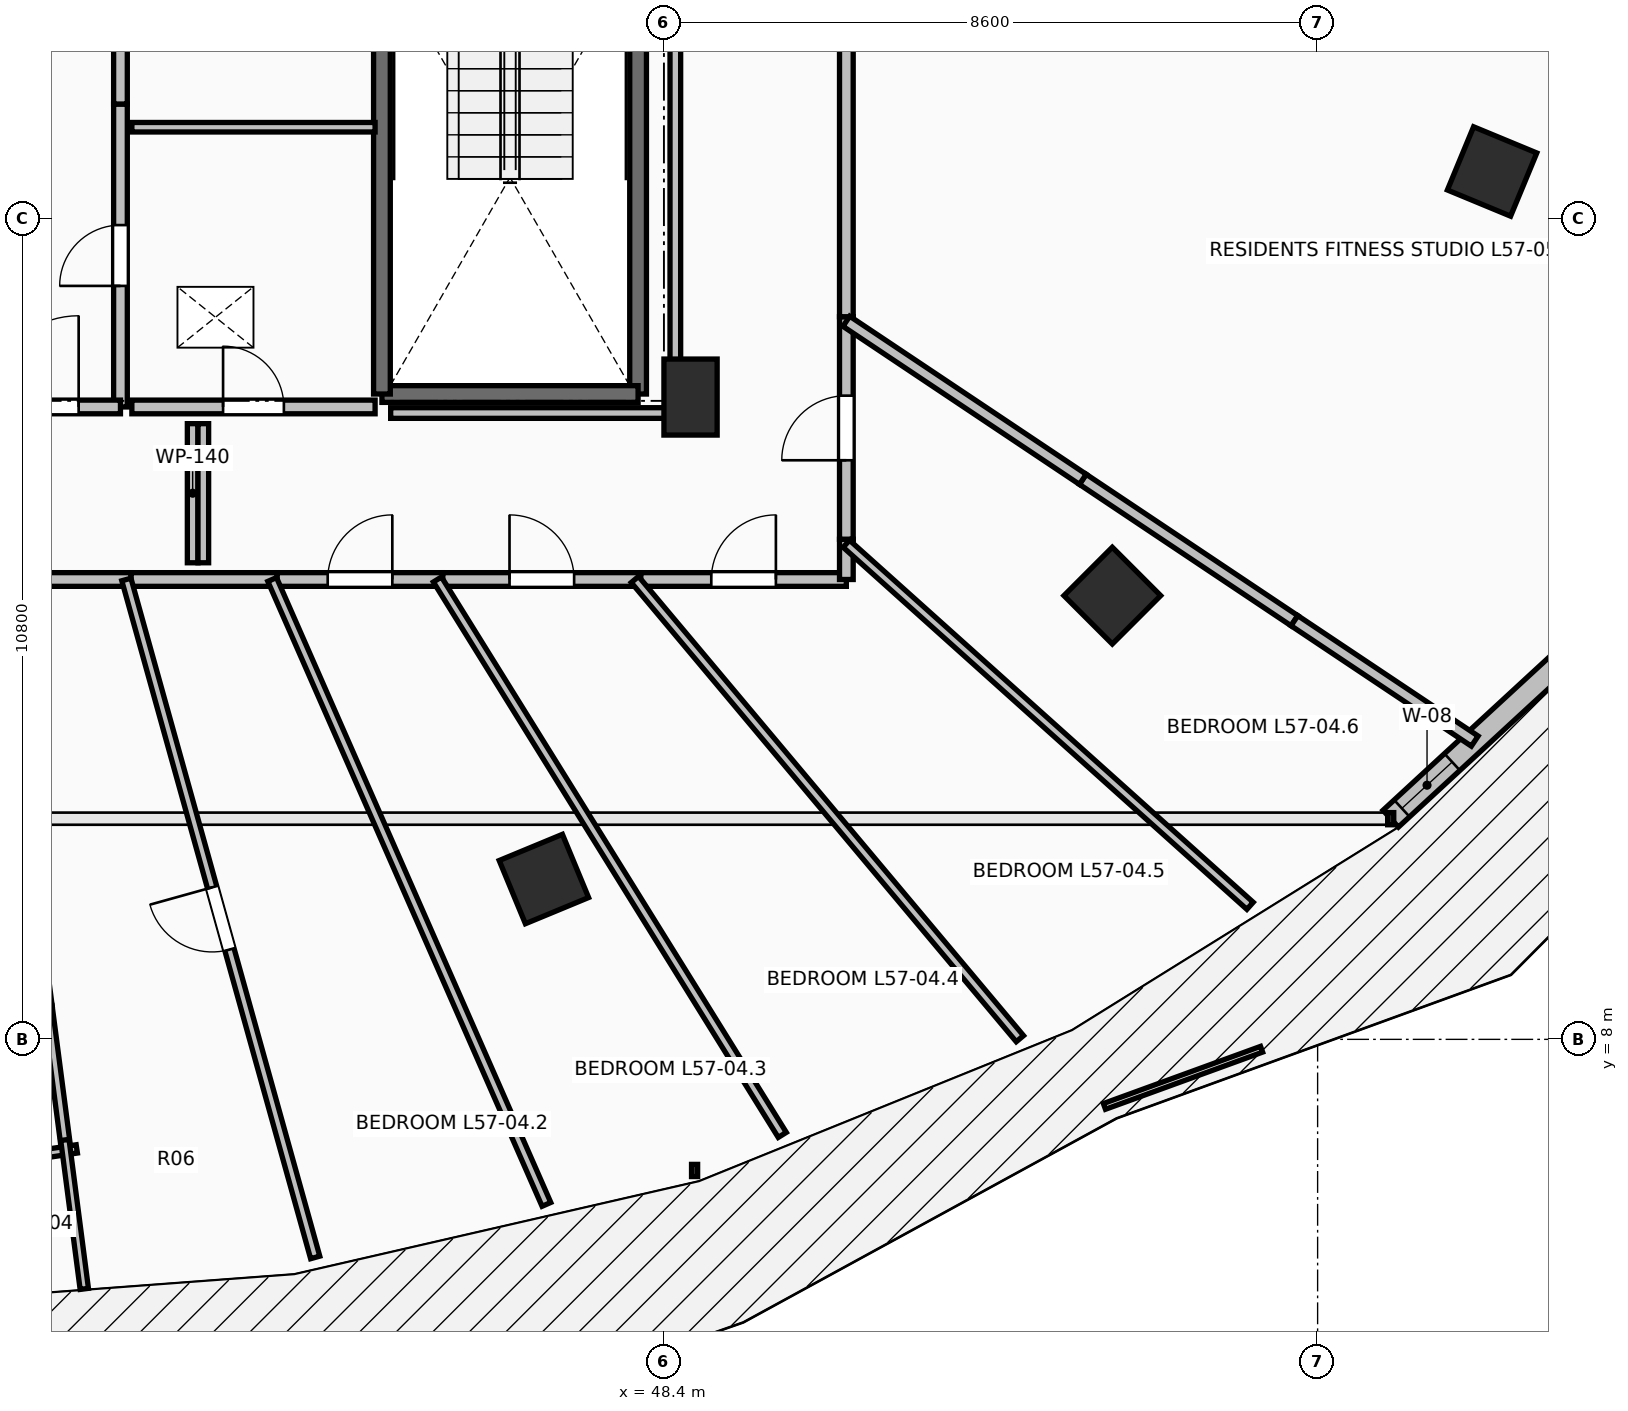
"""IFC4 building model, lengths in metres.
Left out: names, types, materials, properties, quantities, classifications, styles, units other than length and angle.
Written with IfcOpenShell. Run it as: python <this file> out.ifc"""

import sys

from ifc_helpers import new_model, si_unit, direction, frame, frame_2d, origin, origin_2d, place, context, subcontext, project, spatial, rectangle, extrude, element, fill, save


model = new_model("IFC4")
c1 = context("Model", 3, precision=1e-05, world=origin(), true_north=direction((0.0, 1.0)))
c2 = subcontext(c1, "Body", "Model", "MODEL_VIEW")
j1 = project(units=[si_unit("LENGTHUNIT", "METRE"), si_unit("PLANEANGLEUNIT", "RADIAN")], contexts=[c1])
p1 = place(None, origin())
s1 = spatial("IfcSite", under=j1, at=p1, CompositionType="ELEMENT")
p2 = place(p1, origin())
s2 = spatial("IfcBuilding", under=s1, at=p2, CompositionType="ELEMENT")
p3 = place(p2, frame((0.0, 0.0, 210.75)))
s3 = spatial("IfcBuildingStorey", under=s2, at=p3, CompositionType="ELEMENT", Elevation=210.75)
for number, where, z_axis, x_axis in (
    (1, (46.821, 10.109, 0.0), (0.0, 0.0, 1.0), (0.383, -0.924, 0.0)),
    (2, (54.299, 13.838, 0.0), (0.0, 0.0, 1.0), (0.707, -0.707, 0.0)),
    (3, (59.295, 19.418, 0.0), (0.0, 0.0, 1.0), (0.924, -0.383, 0.0)),
):
    element("IfcColumn", number, at=place(p3, frame(where, z_axis=z_axis, x_axis=x_axis)), inside=s3, PredefinedType="COLUMN", context=c2, shape_type="SweptSolid", body=[
        extrude(rectangle(XDim=0.9, YDim=0.9, at=origin_2d()), origin(), (0.0, 0.0, 1.0), 3.55),
    ])
p4 = place(p3, frame((48.75, 16.45, 0.0), z_axis=(0.0, 0.0, 1.0), x_axis=(1.0, 0.0, 0.0)))
e4 = element("IfcColumn", 4, at=p4, inside=s3, PredefinedType="PILASTER", context=c2, shape_type="SweptSolid", body=[
    extrude(rectangle(XDim=0.7, YDim=1.0, at=origin_2d()), origin(), (0.0, 0.0, 1.0), 3.55),
])
p5 = place(p3, frame((57.962, 10.903, 0.0), z_axis=(0.0, 0.0, 1.0), x_axis=(0.735359993374, 0.677676678177, 0.0)))
e5 = element("IfcWall", 5, at=p5, inside=s3, PredefinedType="STANDARD", context=c2, shape_type="SweptSolid", body=[
    extrude(rectangle(XDim=4.774, YDim=0.3, at=frame_2d((2.387, 0.0))), origin(), (0.0, 0.0, 1.0), 3.29),
])
p6 = place(p5, frame((0.2, 0.0, 0.85)))
e6 = element("IfcOpeningElement", 6, at=p6, cuts=e5, PredefinedType="OPENING", context=c2, shape_type="SweptSolid", body=[
    extrude(rectangle(XDim=0.9, YDim=1.8, at=frame_2d((0.45, 0.9))), frame((0.0, 0.165, 0.0), z_axis=(0.0, -1.0, 0.0), x_axis=(1.0, 0.0, 0.0)), (0.0, 0.0, 1.0), 0.33),
])
p7 = place(p3, frame((48.06, 23.91, 0.0), z_axis=(0.0, 0.0, 1.0), x_axis=(0.0, -1.0, 0.0)))
e7 = element("IfcWall", 7, at=p7, inside=s3, PredefinedType="SOLIDWALL", context=c2, shape_type="SweptSolid", body=[
    extrude(rectangle(XDim=7.42, YDim=0.22, at=frame_2d((3.71, 0.0))), origin(), (0.0, 0.0, 1.0), 3.29),
])
p8 = place(p3, frame((48.06, 16.49, 0.0), z_axis=(0.0, 0.0, 1.0), x_axis=(-1.0, 0.0, 0.0)))
e8 = element("IfcWall", 8, at=p8, inside=s3, PredefinedType="SOLIDWALL", context=c2, shape_type="SweptSolid", body=[
    extrude(rectangle(XDim=3.37, YDim=0.22, at=frame_2d((1.685, 0.0))), origin(), (0.0, 0.0, 1.0), 3.29),
])
p9 = place(p3, frame((44.69, 16.49, 0.0), z_axis=(0.0, 0.0, 1.0), x_axis=(0.0, 1.0, 0.0)))
e9 = element("IfcWall", 9, at=p9, inside=s3, PredefinedType="SOLIDWALL", context=c2, shape_type="SweptSolid", body=[
    extrude(rectangle(XDim=7.42, YDim=0.22, at=frame_2d((3.71, 0.0))), origin(), (0.0, 0.0, 1.0), 3.29),
])
p10 = place(p3, frame((41.25, 16.32, 0.0), z_axis=(0.0, 0.0, 1.0), x_axis=(0.0, 1.0, 0.0)))
e10 = element("IfcWall", 10, at=p10, inside=s3, PredefinedType="PARTITIONING", context=c2, shape_type="SweptSolid", body=[
    extrude(rectangle(XDim=3.985, YDim=0.18, at=frame_2d((1.992, 0.0))), origin(), (0.0, 0.0, 1.0), 3.29),
])
p11 = place(p10, frame((1.593, 0.0, 0.0)))
e11 = element("IfcOpeningElement", 11, at=p11, cuts=e10, PredefinedType="OPENING", context=c2, shape_type="SweptSolid", body=[
    extrude(rectangle(XDim=0.8, YDim=2.05, at=frame_2d((0.4, 1.025))), frame((0.0, 0.105, 0.0), z_axis=(0.0, -1.0, 0.0), x_axis=(1.0, 0.0, 0.0)), (0.0, 0.0, 1.0), 0.21),
])
p12 = place(p3, frame((41.25, 20.305, 0.0), z_axis=(0.0, 0.0, 1.0), x_axis=(0.0, 1.0, 0.0)))
e12 = element("IfcWall", 12, at=p12, inside=s3, PredefinedType="PARTITIONING", context=c2, shape_type="SweptSolid", body=[
    extrude(rectangle(XDim=3.895, YDim=0.18, at=frame_2d((1.948, 0.0))), origin(), (0.0, 0.0, 1.0), 3.29),
])
p13 = place(p12, frame((1.522, 0.0, 0.0)))
e13 = element("IfcOpeningElement", 13, at=p13, cuts=e12, PredefinedType="OPENING", context=c2, shape_type="SweptSolid", body=[
    extrude(rectangle(XDim=0.85, YDim=2.1, at=frame_2d((0.425, 1.05))), frame((0.0, 0.105, 0.0), z_axis=(0.0, -1.0, 0.0), x_axis=(1.0, 0.0, 0.0)), (0.0, 0.0, 1.0), 0.21),
])
p14 = place(p3, frame((38.95, 16.32, 0.0), z_axis=(0.0, 0.0, 1.0), x_axis=(1.0, 0.0, 0.0)))
e14 = element("IfcWall", 14, at=p14, inside=s3, PredefinedType="PARTITIONING", context=c2, shape_type="SweptSolid", body=[
    extrude(rectangle(XDim=2.3, YDim=0.18, at=frame_2d((1.15, 0.0))), origin(), (0.0, 0.0, 1.0), 3.29),
])
p15 = place(p14, frame((0.55, 0.0, 0.0)))
e15 = element("IfcOpeningElement", 15, at=p15, cuts=e14, PredefinedType="OPENING", context=c2, shape_type="SweptSolid", body=[
    extrude(rectangle(XDim=1.2, YDim=2.15, at=frame_2d((0.6, 1.075))), frame((0.0, 0.105, 0.0), z_axis=(0.0, -1.0, 0.0), x_axis=(1.0, 0.0, 0.0)), (0.0, 0.0, 1.0), 0.21),
])
p16 = place(p3, frame((44.6, 20.0, 0.0), z_axis=(0.0, 0.0, 1.0), x_axis=(-1.0, 0.0, 0.0)))
e16 = element("IfcWall", 16, at=p16, inside=s3, PredefinedType="PARTITIONING", context=c2, shape_type="SweptSolid", body=[
    extrude(rectangle(XDim=3.2, YDim=0.125, at=frame_2d((1.6, 0.0))), origin(), (0.0, 0.0, 1.0), 3.29),
])
p17 = place(p3, frame((41.4, 16.32, 0.0), z_axis=(0.0, 0.0, 1.0), x_axis=(1.0, 0.0, 0.0)))
e17 = element("IfcWall", 17, at=p17, inside=s3, PredefinedType="PARTITIONING", context=c2, shape_type="SweptSolid", body=[
    extrude(rectangle(XDim=3.2, YDim=0.18, at=frame_2d((1.6, 0.0))), origin(), (0.0, 0.0, 1.0), 3.29),
])
p18 = place(p17, frame((1.2, 0.0, 0.0)))
e18 = element("IfcOpeningElement", 18, at=p18, cuts=e17, PredefinedType="OPENING", context=c2, shape_type="SweptSolid", body=[
    extrude(rectangle(XDim=0.8, YDim=2.05, at=frame_2d((0.4, 1.025))), frame((0.0, 0.105, 0.0), z_axis=(0.0, -1.0, 0.0), x_axis=(1.0, 0.0, 0.0)), (0.0, 0.0, 1.0), 0.21),
])
p19 = place(p3, frame((39.618, 14.05, 0.0), z_axis=(0.0, 0.0, 1.0), x_axis=(1.0, 0.0, 0.0)))
e19 = element("IfcWall", 19, at=p19, inside=s3, PredefinedType="PARTITIONING", context=c2, shape_type="SweptSolid", body=[
    extrude(rectangle(XDim=1.772, YDim=0.18, at=frame_2d((0.886, 0.0))), origin(), (0.0, 0.0, 1.0), 2.979),
])
p20 = place(p3, frame((41.39, 14.05, 0.0), z_axis=(0.0, 0.0, 1.0), x_axis=(1.0, 0.0, 0.0)))
e20 = element("IfcWall", 20, at=p20, inside=s3, PredefinedType="PARTITIONING", context=c2, shape_type="SweptSolid", body=[
    extrude(rectangle(XDim=1.922, YDim=0.18, at=frame_2d((0.961, 0.0))), origin(), (0.0, 0.0, 1.0), 2.979),
])
p21 = place(p3, frame((43.312, 14.05, 0.0), z_axis=(0.0, 0.0, 1.0), x_axis=(1.0, 0.0, 0.0)))
e21 = element("IfcWall", 21, at=p21, inside=s3, PredefinedType="PARTITIONING", context=c2, shape_type="SweptSolid", body=[
    extrude(rectangle(XDim=2.179, YDim=0.18, at=frame_2d((1.089, 0.0))), origin(), (0.0, 0.0, 1.0), 2.482),
])
p22 = place(p21, frame((0.665, 0.0, 0.0)))
e22 = element("IfcOpeningElement", 22, at=p22, cuts=e21, PredefinedType="OPENING", context=c2, shape_type="SweptSolid", body=[
    extrude(rectangle(XDim=0.85, YDim=2.1, at=frame_2d((0.425, 1.05))), frame((0.0, 0.105, 0.0), z_axis=(0.0, -1.0, 0.0), x_axis=(1.0, 0.0, 0.0)), (0.0, 0.0, 1.0), 0.21),
])
p23 = place(p3, frame((45.491, 14.05, 0.0), z_axis=(0.0, 0.0, 1.0), x_axis=(1.0, 0.0, 0.0)))
e23 = element("IfcWall", 23, at=p23, inside=s3, PredefinedType="PARTITIONING", context=c2, shape_type="SweptSolid", body=[
    extrude(rectangle(XDim=2.605, YDim=0.18, at=frame_2d((1.302, 0.0))), origin(), (0.0, 0.0, 1.0), 2.482),
])
p24 = place(p23, frame((0.877, 0.0, 0.0)))
e24 = element("IfcOpeningElement", 24, at=p24, cuts=e23, PredefinedType="OPENING", context=c2, shape_type="SweptSolid", body=[
    extrude(rectangle(XDim=0.85, YDim=2.1, at=frame_2d((0.425, 1.05))), frame((0.0, 0.105, 0.0), z_axis=(0.0, -1.0, 0.0), x_axis=(1.0, 0.0, 0.0)), (0.0, 0.0, 1.0), 0.21),
])
p25 = place(p3, frame((48.096, 14.05, 0.0), z_axis=(0.0, 0.0, 1.0), x_axis=(1.0, 0.0, 0.0)))
e25 = element("IfcWall", 25, at=p25, inside=s3, PredefinedType="PARTITIONING", context=c2, shape_type="SweptSolid", body=[
    extrude(rectangle(XDim=2.704, YDim=0.18, at=frame_2d((1.352, 0.0))), origin(), (0.0, 0.0, 1.0), 2.482),
])
p26 = place(p25, frame((0.927, 0.0, 0.0)))
e26 = element("IfcOpeningElement", 26, at=p26, cuts=e25, PredefinedType="OPENING", context=c2, shape_type="SweptSolid", body=[
    extrude(rectangle(XDim=0.85, YDim=2.1, at=frame_2d((0.425, 1.05))), frame((0.0, 0.105, 0.0), z_axis=(0.0, -1.0, 0.0), x_axis=(1.0, 0.0, 0.0)), (0.0, 0.0, 1.0), 0.21),
])
p27 = place(p3, frame((50.8, 14.05, 0.0), z_axis=(0.0, 0.0, 1.0), x_axis=(0.0, 1.0, 0.0)))
e27 = element("IfcWall", 27, at=p27, inside=s3, PredefinedType="PARTITIONING", context=c2, shape_type="SweptSolid", body=[
    extrude(rectangle(XDim=0.53, YDim=0.18, at=frame_2d((0.265, 0.0))), origin(), (0.0, 0.0, 1.0), 2.936),
])
p28 = place(p3, frame((50.8, 14.58, 0.0), z_axis=(0.0, 0.0, 1.0), x_axis=(0.0, 1.0, 0.0)))
e28 = element("IfcWall", 28, at=p28, inside=s3, PredefinedType="PARTITIONING", context=c2, shape_type="SweptSolid", body=[
    extrude(rectangle(XDim=2.927, YDim=0.18, at=frame_2d((1.463, 0.0))), origin(), (0.0, 0.0, 1.0), 2.482),
])
p29 = place(p28, frame((1.039, 0.0, 0.0)))
e29 = element("IfcOpeningElement", 29, at=p29, cuts=e28, PredefinedType="OPENING", context=c2, shape_type="SweptSolid", body=[
    extrude(rectangle(XDim=0.85, YDim=2.1, at=frame_2d((0.425, 1.05))), frame((0.0, 0.105, 0.0), z_axis=(0.0, -1.0, 0.0), x_axis=(1.0, 0.0, 0.0)), (0.0, 0.0, 1.0), 0.21),
])
p30 = place(p3, frame((50.8, 17.507, 0.0), z_axis=(0.0, 0.0, 1.0), x_axis=(0.0, 1.0, 0.0)))
e30 = element("IfcWall", 30, at=p30, inside=s3, PredefinedType="PARTITIONING", context=c2, shape_type="SweptSolid", body=[
    extrude(rectangle(XDim=7.043, YDim=0.18, at=frame_2d((3.521, 0.0))), origin(), (0.0, 0.0, 1.0), 2.979),
])
p31 = place(p3, frame((40.289, 8.436, 0.0), z_axis=(0.0, 0.0, 1.0), x_axis=(0.12959001093, -0.991567662375, 0.0)))
e31 = element("IfcWall", 31, at=p31, inside=s3, PredefinedType="PARTITIONING", context=c2, shape_type="SweptSolid", body=[
    extrude(rectangle(XDim=1.914, YDim=0.125, at=frame_2d((0.957, 0.0))), origin(), (0.0, 0.0, 1.0), 3.29),
])
p32 = place(p3, frame((40.675, 6.559, 0.0), z_axis=(0.0, 0.0, 1.0), x_axis=(-0.988857545323, -0.148864888602, 0.0)))
e32 = element("IfcWall", 32, at=p32, inside=s3, PredefinedType="PARTITIONING", context=c2, shape_type="SweptSolid", body=[
    extrude(rectangle(XDim=2.845, YDim=0.11, at=frame_2d((1.423, 0.0))), origin(), (0.0, 0.0, 1.0), 3.29),
])
p33 = place(p3, frame((40.774, 4.717, 0.0), z_axis=(0.0, 0.0, 1.0), x_axis=(-0.129233545587, 0.991614184396, 0.0)))
e33 = element("IfcWall", 33, at=p33, inside=s3, PredefinedType="PARTITIONING", context=c2, shape_type="SweptSolid", body=[
    extrude(rectangle(XDim=1.976, YDim=0.11, at=frame_2d((0.988, 0.0))), origin(), (0.0, 0.0, 1.0), 3.29),
])
p34 = place(p3, frame((43.812, 5.131, 0.0), z_axis=(0.0, 0.0, 1.0), x_axis=(-0.268310216589, 0.963332563383, 0.0)))
e34 = element("IfcWall", 34, at=p34, inside=s3, PredefinedType="PARTITIONING", context=c2, shape_type="SweptSolid", body=[
    extrude(rectangle(XDim=9.259, YDim=0.125, at=frame_2d((4.629, 0.0))), origin(), (0.0, 0.0, 1.0), 2.482),
])
p35 = place(p34, frame((4.204, 0.0, 0.0)))
e35 = element("IfcOpeningElement", 35, at=p35, cuts=e34, PredefinedType="OPENING", context=c2, shape_type="SweptSolid", body=[
    extrude(rectangle(XDim=0.85, YDim=2.1, at=frame_2d((0.425, 1.05))), frame((0.0, 0.077, 0.0), z_axis=(0.0, -1.0, 0.0), x_axis=(1.0, 0.0, 0.0)), (0.0, 0.0, 1.0), 0.155),
])
p36 = place(p3, frame((46.854, 5.829, 0.0), z_axis=(0.0, 0.0, 1.0), x_axis=(-0.401869944724, 0.915696755224, 0.0)))
e36 = element("IfcWall", 36, at=p36, inside=s3, PredefinedType="PARTITIONING", context=c2, shape_type="SweptSolid", body=[
    extrude(rectangle(XDim=8.978, YDim=0.125, at=frame_2d((4.489, 0.0))), origin(), (0.0, 0.0, 1.0), 2.482),
])
p37 = place(p3, frame((49.957, 6.743, 0.0), z_axis=(0.0, 0.0, 1.0), x_axis=(-0.527501342892, 0.849554196769, 0.0)))
e37 = element("IfcWall", 37, at=p37, inside=s3, PredefinedType="PARTITIONING", context=c2, shape_type="SweptSolid", body=[
    extrude(rectangle(XDim=8.601, YDim=0.125, at=frame_2d((4.301, 0.0))), origin(), (0.0, 0.0, 1.0), 2.482),
])
p38 = place(p3, frame((53.083, 8.009, 0.0), z_axis=(0.0, 0.0, 1.0), x_axis=(-0.642484403916, 0.766298760749, 0.0)))
e38 = element("IfcWall", 38, at=p38, inside=s3, PredefinedType="PARTITIONING", context=c2, shape_type="SweptSolid", body=[
    extrude(rectangle(XDim=7.883, YDim=0.125, at=frame_2d((3.942, 0.0))), origin(), (0.0, 0.0, 1.0), 2.482),
])
p39 = place(p3, frame((56.111, 9.757, 0.0), z_axis=(0.0, 0.0, 1.0), x_axis=(-0.744477346253, 0.667647722168, 0.0)))
e39 = element("IfcWall", 39, at=p39, inside=s3, PredefinedType="PARTITIONING", context=c2, shape_type="SweptSolid", body=[
    extrude(rectangle(XDim=7.134, YDim=0.125, at=frame_2d((3.567, 0.0))), origin(), (0.0, 0.0, 1.0), 2.824),
])
p40 = place(p3, frame((56.695, 13.508, 0.0), z_axis=(0.0, 0.0, 1.0), x_axis=(-0.831533913479, 0.55547398745, 0.0)))
e40 = element("IfcWall", 40, at=p40, inside=s3, PredefinedType="PARTITIONING", context=c2, shape_type="SweptSolid", body=[
    extrude(rectangle(XDim=3.348, YDim=0.16, at=frame_2d((1.674, 0.0))), origin(), (0.0, 0.0, 1.0), 2.824),
])
p41 = place(p3, frame((53.911, 15.368, 0.0), z_axis=(0.0, 0.0, 1.0), x_axis=(-0.83140728108, 0.55566350696, 0.0)))
e41 = element("IfcWall", 41, at=p41, inside=s3, PredefinedType="PARTITIONING", context=c2, shape_type="SweptSolid", body=[
    extrude(rectangle(XDim=3.742, YDim=0.16, at=frame_2d((1.871, 0.0))), origin(), (0.0, 0.0, 1.0), 2.936),
])
p42 = place(p3, frame((59.067, 11.924, 0.0), z_axis=(0.0, 0.0, 1.0), x_axis=(-0.831602270354, 0.555371644885, 0.0)))
e42 = element("IfcWall", 42, at=p42, inside=s3, PredefinedType="PARTITIONING", context=c2, shape_type="SweptSolid", body=[
    extrude(rectangle(XDim=2.852, YDim=0.16, at=frame_2d((1.426, 0.0))), origin(), (0.0, 0.0, 1.0), 3.29),
])
p43 = place(p3, frame((44.805, 16.24, 0.0), z_axis=(0.0, 0.0, 1.0), x_axis=(1.0, 0.0, 0.0)))
e43 = element("IfcWall", 43, at=p43, inside=s3, PredefinedType="PARTITIONING", context=c2, shape_type="SweptSolid", body=[
    extrude(rectangle(XDim=3.745, YDim=0.14, at=frame_2d((1.873, 0.0))), origin(), (0.0, 0.0, 1.0), 2.482),
])
p44 = place(p3, frame((48.55, 16.24, 0.0), z_axis=(0.0, 0.0, 1.0), x_axis=(0.0, 1.0, 0.0)))
e44 = element("IfcWall", 44, at=p44, inside=s3, PredefinedType="PARTITIONING", context=c2, shape_type="SweptSolid", body=[
    extrude(rectangle(XDim=7.514, YDim=0.14, at=frame_2d((3.757, 0.0))), origin(), (0.0, 0.0, 1.0), 2.482),
])
for number, where, z_axis, x_axis in (
    (45, (42.2, 16.1, 0.0), (0.0, 0.0, 1.0), (0.0, -1.0, 0.0)),
    (46, (42.34, 14.27, 0.0), (0.0, 0.0, 1.0), (0.0, 1.0, 0.0)),
):
    element("IfcWall", number, at=place(p3, frame(where, z_axis=z_axis, x_axis=x_axis)), inside=s3, PredefinedType="PARTITIONING", context=c2, shape_type="SweptSolid", body=[
        extrude(rectangle(XDim=1.83, YDim=0.14, at=frame_2d((0.915, 0.0))), origin(), (0.0, 0.0, 1.0), 2.979),
    ])
p45 = place(p6, origin())
e47 = element("IfcWindow", 47, at=p45, inside=s3, PartitioningType="SINGLE_PANEL", PredefinedType="WINDOW", context=c2, shape_type="SweptSolid", body=[
    extrude(rectangle(XDim=0.9, YDim=1.8, at=frame_2d((0.45, 0.9))), frame((0.0, 0.03, 0.0), z_axis=(0.0, -1.0, 0.0), x_axis=(1.0, 0.0, 0.0)), (0.0, 0.0, 1.0), 0.06),
])
fill(e6, e47)
p46 = place(p11, origin())
e48 = element("IfcDoor", 48, at=p46, inside=s3, OperationType="SINGLE_SWING_LEFT", PredefinedType="DOOR", context=c2, shape_type="SweptSolid", body=[
    extrude(rectangle(XDim=0.8, YDim=2.05, at=frame_2d((0.4, 1.025))), frame((0.0, 0.025, 0.0), z_axis=(0.0, -1.0, 0.0), x_axis=(1.0, 0.0, 0.0)), (0.0, 0.0, 1.0), 0.05),
])
fill(e11, e48)
p47 = place(p15, origin())
e49 = element("IfcDoor", 49, at=p47, inside=s3, OperationType="SINGLE_SWING_RIGHT", PredefinedType="DOOR", context=c2, shape_type="SweptSolid", body=[
    extrude(rectangle(XDim=1.2, YDim=2.15, at=frame_2d((0.6, 1.075))), frame((0.0, 0.025, 0.0), z_axis=(0.0, -1.0, 0.0), x_axis=(1.0, 0.0, 0.0)), (0.0, 0.0, 1.0), 0.05),
])
fill(e15, e49)
p48 = place(p18, origin())
e50 = element("IfcDoor", 50, at=p48, inside=s3, OperationType="SINGLE_SWING_LEFT", PredefinedType="DOOR", context=c2, shape_type="SweptSolid", body=[
    extrude(rectangle(XDim=0.8, YDim=2.05, at=frame_2d((0.4, 1.025))), frame((0.0, 0.025, 0.0), z_axis=(0.0, -1.0, 0.0), x_axis=(1.0, 0.0, 0.0)), (0.0, 0.0, 1.0), 0.05),
])
fill(e18, e50)
p49 = place(p22, origin())
e51 = element("IfcDoor", 51, at=p49, inside=s3, OperationType="SINGLE_SWING_RIGHT", PredefinedType="DOOR", context=c2, shape_type="SweptSolid", body=[
    extrude(rectangle(XDim=0.85, YDim=2.1, at=frame_2d((0.425, 1.05))), frame((0.0, 0.025, 0.0), z_axis=(0.0, -1.0, 0.0), x_axis=(1.0, 0.0, 0.0)), (0.0, 0.0, 1.0), 0.05),
])
fill(e22, e51)
p50 = place(p24, origin())
e52 = element("IfcDoor", 52, at=p50, inside=s3, OperationType="SINGLE_SWING_LEFT", PredefinedType="DOOR", context=c2, shape_type="SweptSolid", body=[
    extrude(rectangle(XDim=0.85, YDim=2.1, at=frame_2d((0.425, 1.05))), frame((0.0, 0.025, 0.0), z_axis=(0.0, -1.0, 0.0), x_axis=(1.0, 0.0, 0.0)), (0.0, 0.0, 1.0), 0.05),
])
fill(e24, e52)
p51 = place(p26, origin())
e53 = element("IfcDoor", 53, at=p51, inside=s3, OperationType="SINGLE_SWING_RIGHT", PredefinedType="DOOR", context=c2, shape_type="SweptSolid", body=[
    extrude(rectangle(XDim=0.85, YDim=2.1, at=frame_2d((0.425, 1.05))), frame((0.0, 0.025, 0.0), z_axis=(0.0, -1.0, 0.0), x_axis=(1.0, 0.0, 0.0)), (0.0, 0.0, 1.0), 0.05),
])
fill(e26, e53)
p52 = place(p29, origin())
e54 = element("IfcDoor", 54, at=p52, inside=s3, OperationType="SINGLE_SWING_LEFT", PredefinedType="DOOR", context=c2, shape_type="SweptSolid", body=[
    extrude(rectangle(XDim=0.85, YDim=2.1, at=frame_2d((0.425, 1.05))), frame((0.0, 0.025, 0.0), z_axis=(0.0, -1.0, 0.0), x_axis=(1.0, 0.0, 0.0)), (0.0, 0.0, 1.0), 0.05),
])
fill(e29, e54)
p53 = place(p35, origin())
e55 = element("IfcDoor", 55, at=p53, inside=s3, OperationType="SINGLE_SWING_RIGHT", PredefinedType="DOOR", context=c2, shape_type="SweptSolid", body=[
    extrude(rectangle(XDim=0.85, YDim=2.1, at=frame_2d((0.425, 1.05))), frame((0.0, 0.025, 0.0), z_axis=(0.0, -1.0, 0.0), x_axis=(1.0, 0.0, 0.0)), (0.0, 0.0, 1.0), 0.05),
])
fill(e35, e55)
save(model, sys.argv[1])
